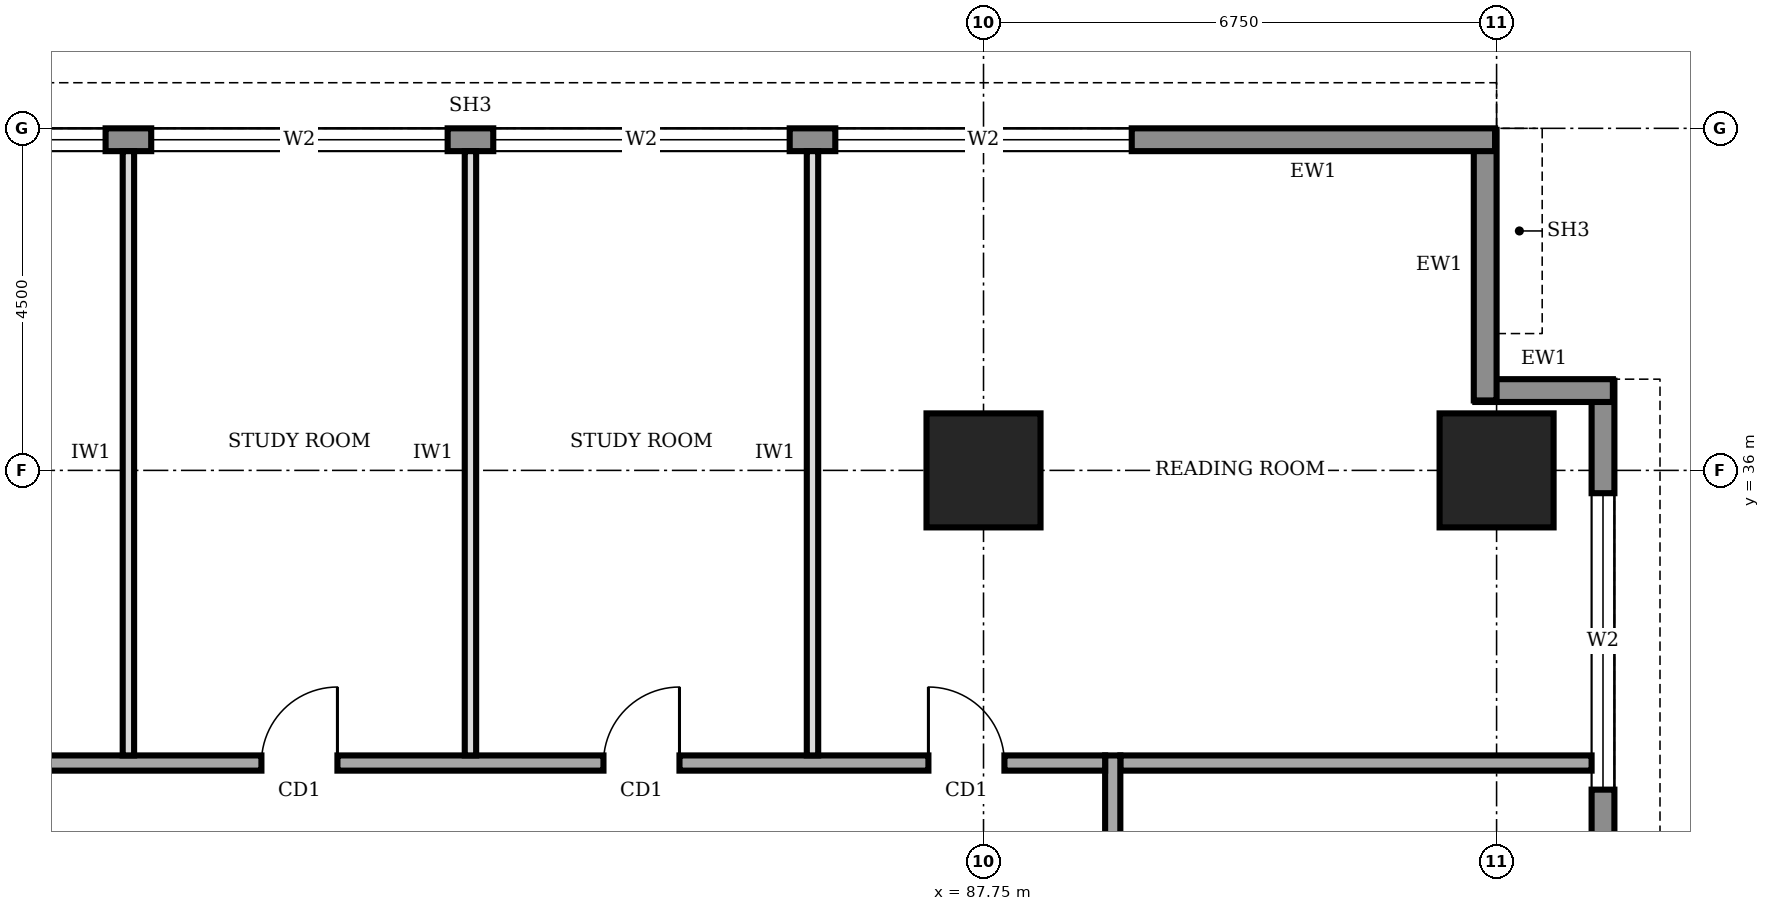
"""IFC4 building model, lengths in metres.
Left out: names, types, materials, properties, quantities, classifications, styles, units other than length and angle.
Written with IfcOpenShell. Run it as: python <this file> out.ifc"""

import sys

from ifc_helpers import new_model, si_unit, direction, frame, frame_2d, origin, origin_2d, place, context, subcontext, project, spatial, rectangle, extrude, element, fill, save


model = new_model("IFC4")
c1 = context("Model", 3, precision=1e-05, world=origin(), true_north=direction((0.0, 1.0)))
c2 = subcontext(c1, "Body", "Model", "MODEL_VIEW")
j1 = project(units=[si_unit("LENGTHUNIT", "METRE"), si_unit("PLANEANGLEUNIT", "RADIAN")], contexts=[c1])
p1 = place(None, origin())
s1 = spatial("IfcSite", under=j1, at=p1, CompositionType="ELEMENT")
p2 = place(p1, origin())
s2 = spatial("IfcBuilding", under=s1, at=p2, CompositionType="ELEMENT")
p3 = place(p2, frame((0.0, 0.0, 161.0)))
s3 = spatial("IfcBuildingStorey", under=s2, at=p3, CompositionType="ELEMENT", Elevation=161.0)
for number, where, z_axis, x_axis in (
    (1, (87.75, 36.0, 0.0), (0.0, 0.0, 1.0), (1.0, 0.0, 0.0)),
    (2, (94.5, 36.0, 0.0), (0.0, 0.0, 1.0), (1.0, 0.0, 0.0)),
):
    element("IfcColumn", number, at=place(p3, frame(where, z_axis=z_axis, x_axis=x_axis)), inside=s3, PredefinedType="COLUMN", context=c2, shape_type="SweptSolid", body=[
        extrude(rectangle(XDim=1.5, YDim=1.5, at=origin_2d()), origin(), (0.0, 0.0, 1.0), 4.0),
    ])
p4 = place(p3, frame((95.9, 3.32, 0.0), z_axis=(0.0, 0.0, 1.0), x_axis=(0.0, 1.0, 0.0)))
e3 = element("IfcWall", 3, at=p4, inside=s3, PredefinedType="STANDARD", context=c2, shape_type="SweptSolid", body=[
    extrude(rectangle(XDim=33.86, YDim=0.3, at=frame_2d((16.93, 0.0))), origin(), (0.0, 0.0, 1.0), 3.75),
])
p5 = place(p4, frame((1.48, 0.0, 0.6)))
e4 = element("IfcOpeningElement", 4, at=p5, cuts=e3, PredefinedType="OPENING", context=c2, shape_type="SweptSolid", body=[
    extrude(rectangle(XDim=3.9, YDim=2.6, at=frame_2d((1.95, 1.3))), frame((0.0, 0.16, 0.0), z_axis=(0.0, -1.0, 0.0), x_axis=(1.0, 0.0, 0.0)), (0.0, 0.0, 1.0), 0.32),
])
p6 = place(p4, frame((5.98, 0.0, 0.6)))
e5 = element("IfcOpeningElement", 5, at=p6, cuts=e3, PredefinedType="OPENING", context=c2, shape_type="SweptSolid", body=[
    extrude(rectangle(XDim=3.9, YDim=2.6, at=frame_2d((1.95, 1.3))), frame((0.0, 0.16, 0.0), z_axis=(0.0, -1.0, 0.0), x_axis=(1.0, 0.0, 0.0)), (0.0, 0.0, 1.0), 0.32),
])
p7 = place(p4, frame((10.48, 0.0, 0.6)))
e6 = element("IfcOpeningElement", 6, at=p7, cuts=e3, PredefinedType="OPENING", context=c2, shape_type="SweptSolid", body=[
    extrude(rectangle(XDim=3.9, YDim=2.6, at=frame_2d((1.95, 1.3))), frame((0.0, 0.16, 0.0), z_axis=(0.0, -1.0, 0.0), x_axis=(1.0, 0.0, 0.0)), (0.0, 0.0, 1.0), 0.32),
])
p8 = place(p4, frame((14.98, 0.0, 0.6)))
e7 = element("IfcOpeningElement", 7, at=p8, cuts=e3, PredefinedType="OPENING", context=c2, shape_type="SweptSolid", body=[
    extrude(rectangle(XDim=3.9, YDim=2.6, at=frame_2d((1.95, 1.3))), frame((0.0, 0.16, 0.0), z_axis=(0.0, -1.0, 0.0), x_axis=(1.0, 0.0, 0.0)), (0.0, 0.0, 1.0), 0.32),
])
p9 = place(p4, frame((19.48, 0.0, 0.6)))
e8 = element("IfcOpeningElement", 8, at=p9, cuts=e3, PredefinedType="OPENING", context=c2, shape_type="SweptSolid", body=[
    extrude(rectangle(XDim=3.9, YDim=2.6, at=frame_2d((1.95, 1.3))), frame((0.0, 0.16, 0.0), z_axis=(0.0, -1.0, 0.0), x_axis=(1.0, 0.0, 0.0)), (0.0, 0.0, 1.0), 0.32),
])
p10 = place(p4, frame((23.98, 0.0, 0.6)))
e9 = element("IfcOpeningElement", 9, at=p10, cuts=e3, PredefinedType="OPENING", context=c2, shape_type="SweptSolid", body=[
    extrude(rectangle(XDim=3.9, YDim=2.6, at=frame_2d((1.95, 1.3))), frame((0.0, 0.16, 0.0), z_axis=(0.0, -1.0, 0.0), x_axis=(1.0, 0.0, 0.0)), (0.0, 0.0, 1.0), 0.32),
])
p11 = place(p4, frame((28.48, 0.0, 0.6)))
e10 = element("IfcOpeningElement", 10, at=p11, cuts=e3, PredefinedType="OPENING", context=c2, shape_type="SweptSolid", body=[
    extrude(rectangle(XDim=3.9, YDim=2.6, at=frame_2d((1.95, 1.3))), frame((0.0, 0.16, 0.0), z_axis=(0.0, -1.0, 0.0), x_axis=(1.0, 0.0, 0.0)), (0.0, 0.0, 1.0), 0.32),
])
p12 = place(p3, frame((96.03, 37.05, 0.0), z_axis=(0.0, 0.0, 1.0), x_axis=(-1.0, 0.0, 0.0)))
e11 = element("IfcWall", 11, at=p12, inside=s3, PredefinedType="STANDARD", context=c2, shape_type="SweptSolid", body=[
    extrude(rectangle(XDim=1.81, YDim=0.3, at=frame_2d((0.905, 0.0))), origin(), (0.0, 0.0, 1.0), 3.75),
])
p13 = place(p3, frame((94.35, 36.92, 0.0), z_axis=(0.0, 0.0, 1.0), x_axis=(0.0, 1.0, 0.0)))
e12 = element("IfcWall", 12, at=p13, inside=s3, PredefinedType="STANDARD", context=c2, shape_type="SweptSolid", body=[
    extrude(rectangle(XDim=3.56, YDim=0.3, at=frame_2d((1.78, 0.0))), origin(), (0.0, 0.0, 1.0), 2.85),
])
p14 = place(p3, frame((94.48, 40.35, 0.0), z_axis=(0.0, 0.0, 1.0), x_axis=(-1.0, 0.0, 0.0)))
e13 = element("IfcWall", 13, at=p14, inside=s3, PredefinedType="STANDARD", context=c2, shape_type="SweptSolid", body=[
    extrude(rectangle(XDim=26.96, YDim=0.3, at=frame_2d((13.48, 0.0))), origin(), (0.0, 0.0, 1.0), 3.75),
])
p15 = place(p14, frame((22.78, 0.0, 0.6)))
e14 = element("IfcOpeningElement", 14, at=p15, cuts=e13, PredefinedType="OPENING", context=c2, shape_type="SweptSolid", body=[
    extrude(rectangle(XDim=3.9, YDim=2.6, at=frame_2d((1.95, 1.3))), frame((0.0, 0.16, 0.0), z_axis=(0.0, -1.0, 0.0), x_axis=(1.0, 0.0, 0.0)), (0.0, 0.0, 1.0), 0.32),
])
p16 = place(p14, frame((18.28, 0.0, 0.6)))
e15 = element("IfcOpeningElement", 15, at=p16, cuts=e13, PredefinedType="OPENING", context=c2, shape_type="SweptSolid", body=[
    extrude(rectangle(XDim=3.9, YDim=2.6, at=frame_2d((1.95, 1.3))), frame((0.0, 0.16, 0.0), z_axis=(0.0, -1.0, 0.0), x_axis=(1.0, 0.0, 0.0)), (0.0, 0.0, 1.0), 0.32),
])
p17 = place(p14, frame((13.78, 0.0, 0.6)))
e16 = element("IfcOpeningElement", 16, at=p17, cuts=e13, PredefinedType="OPENING", context=c2, shape_type="SweptSolid", body=[
    extrude(rectangle(XDim=3.9, YDim=2.6, at=frame_2d((1.95, 1.3))), frame((0.0, 0.16, 0.0), z_axis=(0.0, -1.0, 0.0), x_axis=(1.0, 0.0, 0.0)), (0.0, 0.0, 1.0), 0.32),
])
p18 = place(p14, frame((9.28, 0.0, 0.6)))
e17 = element("IfcOpeningElement", 17, at=p18, cuts=e13, PredefinedType="OPENING", context=c2, shape_type="SweptSolid", body=[
    extrude(rectangle(XDim=3.9, YDim=2.6, at=frame_2d((1.95, 1.3))), frame((0.0, 0.16, 0.0), z_axis=(0.0, -1.0, 0.0), x_axis=(1.0, 0.0, 0.0)), (0.0, 0.0, 1.0), 0.32),
])
p19 = place(p14, frame((4.78, 0.0, 0.6)))
e18 = element("IfcOpeningElement", 18, at=p19, cuts=e13, PredefinedType="OPENING", context=c2, shape_type="SweptSolid", body=[
    extrude(rectangle(XDim=3.9, YDim=2.6, at=frame_2d((1.95, 1.3))), frame((0.0, 0.16, 0.0), z_axis=(0.0, -1.0, 0.0), x_axis=(1.0, 0.0, 0.0)), (0.0, 0.0, 1.0), 0.32),
])
p20 = place(p3, frame((89.45, 9.2, 0.0), z_axis=(0.0, 0.0, 1.0), x_axis=(0.0, 1.0, 0.0)))
e19 = element("IfcWall", 19, at=p20, inside=s3, PredefinedType="SOLIDWALL", context=c2, shape_type="SweptSolid", body=[
    extrude(rectangle(XDim=23.05, YDim=0.2, at=frame_2d((11.525, 0.0))), origin(), (0.0, 0.0, 1.0), 3.75),
])
p21 = place(p20, frame((1.55, 0.0, 0.0)))
e20 = element("IfcOpeningElement", 20, at=p21, cuts=e19, PredefinedType="OPENING", context=c2, shape_type="SweptSolid", body=[
    extrude(rectangle(XDim=1.0, YDim=2.1, at=frame_2d((0.5, 1.05))), frame((0.0, 0.11, 0.0), z_axis=(0.0, -1.0, 0.0), x_axis=(1.0, 0.0, 0.0)), (0.0, 0.0, 1.0), 0.22),
])
p22 = place(p20, frame((5.75, 0.0, 0.0)))
e21 = element("IfcOpeningElement", 21, at=p22, cuts=e19, PredefinedType="OPENING", context=c2, shape_type="SweptSolid", body=[
    extrude(rectangle(XDim=0.9, YDim=2.1, at=frame_2d((0.45, 1.05))), frame((0.0, 0.11, 0.0), z_axis=(0.0, -1.0, 0.0), x_axis=(1.0, 0.0, 0.0)), (0.0, 0.0, 1.0), 0.22),
])
p23 = place(p20, frame((8.75, 0.0, 0.0)))
e22 = element("IfcOpeningElement", 22, at=p23, cuts=e19, PredefinedType="OPENING", context=c2, shape_type="SweptSolid", body=[
    extrude(rectangle(XDim=0.9, YDim=2.1, at=frame_2d((0.45, 1.05))), frame((0.0, 0.11, 0.0), z_axis=(0.0, -1.0, 0.0), x_axis=(1.0, 0.0, 0.0)), (0.0, 0.0, 1.0), 0.22),
])
p24 = place(p20, frame((13.6, 0.0, 0.0)))
e23 = element("IfcOpeningElement", 23, at=p24, cuts=e19, PredefinedType="OPENING", context=c2, shape_type="SweptSolid", body=[
    extrude(rectangle(XDim=0.9, YDim=2.1, at=frame_2d((0.45, 1.05))), frame((0.0, 0.11, 0.0), z_axis=(0.0, -1.0, 0.0), x_axis=(1.0, 0.0, 0.0)), (0.0, 0.0, 1.0), 0.22),
])
p25 = place(p20, frame((16.3, 0.0, 0.0)))
e24 = element("IfcOpeningElement", 24, at=p25, cuts=e19, PredefinedType="OPENING", context=c2, shape_type="SweptSolid", body=[
    extrude(rectangle(XDim=1.0, YDim=2.1, at=frame_2d((0.5, 1.05))), frame((0.0, 0.11, 0.0), z_axis=(0.0, -1.0, 0.0), x_axis=(1.0, 0.0, 0.0)), (0.0, 0.0, 1.0), 0.22),
])
p26 = place(p20, frame((10.8, 0.0, 0.0)))
e25 = element("IfcOpeningElement", 25, at=p26, cuts=e19, PredefinedType="OPENING", context=c2, shape_type="SweptSolid", body=[
    extrude(rectangle(XDim=1.0, YDim=2.1, at=frame_2d((0.5, 1.05))), frame((0.0, 0.11, 0.0), z_axis=(0.0, -1.0, 0.0), x_axis=(1.0, 0.0, 0.0)), (0.0, 0.0, 1.0), 0.22),
])
p27 = place(p20, frame((19.925, 0.0, 0.0)))
e26 = element("IfcOpeningElement", 26, at=p27, cuts=e19, PredefinedType="OPENING", context=c2, shape_type="SweptSolid", body=[
    extrude(rectangle(XDim=1.0, YDim=2.1, at=frame_2d((0.5, 1.05))), frame((0.0, 0.11, 0.0), z_axis=(0.0, -1.0, 0.0), x_axis=(1.0, 0.0, 0.0)), (0.0, 0.0, 1.0), 0.22),
])
p28 = place(p3, frame((89.35, 32.15, 0.0), z_axis=(0.0, 0.0, 1.0), x_axis=(-1.0, 0.0, 0.0)))
e27 = element("IfcWall", 27, at=p28, inside=s3, PredefinedType="SOLIDWALL", context=c2, shape_type="SweptSolid", body=[
    extrude(rectangle(XDim=26.05, YDim=0.2, at=frame_2d((13.025, 0.0))), origin(), (0.0, 0.0, 1.0), 3.75),
])
p29 = place(p28, frame((19.05, 0.0, 0.0)))
e28 = element("IfcOpeningElement", 28, at=p29, cuts=e27, PredefinedType="OPENING", context=c2, shape_type="SweptSolid", body=[
    extrude(rectangle(XDim=1.0, YDim=2.1, at=frame_2d((0.5, 1.05))), frame((0.0, 0.11, 0.0), z_axis=(0.0, -1.0, 0.0), x_axis=(1.0, 0.0, 0.0)), (0.0, 0.0, 1.0), 0.22),
])
p30 = place(p28, frame((10.1, 0.0, 0.0)))
e29 = element("IfcOpeningElement", 29, at=p30, cuts=e27, PredefinedType="OPENING", context=c2, shape_type="SweptSolid", body=[
    extrude(rectangle(XDim=1.0, YDim=2.1, at=frame_2d((0.5, 1.05))), frame((0.0, 0.11, 0.0), z_axis=(0.0, -1.0, 0.0), x_axis=(1.0, 0.0, 0.0)), (0.0, 0.0, 1.0), 0.22),
])
p31 = place(p28, frame((5.6, 0.0, 0.0)))
e30 = element("IfcOpeningElement", 30, at=p31, cuts=e27, PredefinedType="OPENING", context=c2, shape_type="SweptSolid", body=[
    extrude(rectangle(XDim=1.0, YDim=2.1, at=frame_2d((0.5, 1.05))), frame((0.0, 0.11, 0.0), z_axis=(0.0, -1.0, 0.0), x_axis=(1.0, 0.0, 0.0)), (0.0, 0.0, 1.0), 0.22),
])
p32 = place(p28, frame((1.325, 0.0, 0.0)))
e31 = element("IfcOpeningElement", 31, at=p32, cuts=e27, PredefinedType="OPENING", context=c2, shape_type="SweptSolid", body=[
    extrude(rectangle(XDim=1.0, YDim=2.1, at=frame_2d((0.5, 1.05))), frame((0.0, 0.11, 0.0), z_axis=(0.0, -1.0, 0.0), x_axis=(1.0, 0.0, 0.0)), (0.0, 0.0, 1.0), 0.22),
])
p33 = place(p3, frame((89.55, 32.15, 0.0), z_axis=(0.0, 0.0, 1.0), x_axis=(1.0, 0.0, 0.0)))
e32 = element("IfcWall", 32, at=p33, inside=s3, PredefinedType="SOLIDWALL", context=c2, shape_type="SweptSolid", body=[
    extrude(rectangle(XDim=6.2, YDim=0.2, at=frame_2d((3.1, 0.0))), origin(), (0.0, 0.0, 1.0), 3.75),
])
for number, where, z_axis, x_axis in (
    (33, (76.5, 32.25, 0.0), (0.0, 0.0, 1.0), (0.0, 1.0, 0.0)),
    (34, (81.0, 32.25, 0.0), (0.0, 0.0, 1.0), (0.0, 1.0, 0.0)),
    (35, (85.5, 32.25, 0.0), (0.0, 0.0, 1.0), (0.0, 1.0, 0.0)),
):
    element("IfcWall", number, at=place(p3, frame(where, z_axis=z_axis, x_axis=x_axis)), inside=s3, PredefinedType="PARTITIONING", context=c2, shape_type="SweptSolid", body=[
        extrude(rectangle(XDim=7.95, YDim=0.15, at=frame_2d((3.975, 0.0))), origin(), (0.0, 0.0, 1.0), 3.75),
    ])
p34 = place(p11, origin())
e36 = element("IfcWindow", 36, at=p34, inside=s3, PartitioningType="SINGLE_PANEL", PredefinedType="WINDOW", context=c2, shape_type="SweptSolid", body=[
    extrude(rectangle(XDim=3.9, YDim=2.6, at=frame_2d((1.95, 1.3))), frame((0.0, 0.03, 0.0), z_axis=(0.0, -1.0, 0.0), x_axis=(1.0, 0.0, 0.0)), (0.0, 0.0, 1.0), 0.06),
])
fill(e10, e36)
p35 = place(p16, origin())
e37 = element("IfcWindow", 37, at=p35, inside=s3, PartitioningType="SINGLE_PANEL", PredefinedType="WINDOW", context=c2, shape_type="SweptSolid", body=[
    extrude(rectangle(XDim=3.9, YDim=2.6, at=frame_2d((1.95, 1.3))), frame((0.0, 0.03, 0.0), z_axis=(0.0, -1.0, 0.0), x_axis=(1.0, 0.0, 0.0)), (0.0, 0.0, 1.0), 0.06),
])
fill(e15, e37)
p36 = place(p17, origin())
e38 = element("IfcWindow", 38, at=p36, inside=s3, PartitioningType="SINGLE_PANEL", PredefinedType="WINDOW", context=c2, shape_type="SweptSolid", body=[
    extrude(rectangle(XDim=3.9, YDim=2.6, at=frame_2d((1.95, 1.3))), frame((0.0, 0.03, 0.0), z_axis=(0.0, -1.0, 0.0), x_axis=(1.0, 0.0, 0.0)), (0.0, 0.0, 1.0), 0.06),
])
fill(e16, e38)
p37 = place(p18, origin())
e39 = element("IfcWindow", 39, at=p37, inside=s3, PartitioningType="SINGLE_PANEL", PredefinedType="WINDOW", context=c2, shape_type="SweptSolid", body=[
    extrude(rectangle(XDim=3.9, YDim=2.6, at=frame_2d((1.95, 1.3))), frame((0.0, 0.03, 0.0), z_axis=(0.0, -1.0, 0.0), x_axis=(1.0, 0.0, 0.0)), (0.0, 0.0, 1.0), 0.06),
])
fill(e17, e39)
p38 = place(p19, origin())
e40 = element("IfcWindow", 40, at=p38, inside=s3, PartitioningType="SINGLE_PANEL", PredefinedType="WINDOW", context=c2, shape_type="SweptSolid", body=[
    extrude(rectangle(XDim=3.9, YDim=2.6, at=frame_2d((1.95, 1.3))), frame((0.0, 0.03, 0.0), z_axis=(0.0, -1.0, 0.0), x_axis=(1.0, 0.0, 0.0)), (0.0, 0.0, 1.0), 0.06),
])
fill(e18, e40)
p39 = place(p30, frame((1.0, 0.0, 0.0), z_axis=(0.0, 0.0, 1.0), x_axis=(-1.0, 0.0, 0.0)))
e41 = element("IfcDoor", 41, at=p39, inside=s3, OperationType="SINGLE_SWING_RIGHT", PredefinedType="DOOR", context=c2, shape_type="SweptSolid", body=[
    extrude(rectangle(XDim=1.0, YDim=2.1, at=frame_2d((0.5, 1.05))), frame((0.0, 0.025, 0.0), z_axis=(0.0, -1.0, 0.0), x_axis=(1.0, 0.0, 0.0)), (0.0, 0.0, 1.0), 0.05),
])
fill(e29, e41)
p40 = place(p31, frame((1.0, 0.0, 0.0), z_axis=(0.0, 0.0, 1.0), x_axis=(-1.0, 0.0, 0.0)))
e42 = element("IfcDoor", 42, at=p40, inside=s3, OperationType="SINGLE_SWING_RIGHT", PredefinedType="DOOR", context=c2, shape_type="SweptSolid", body=[
    extrude(rectangle(XDim=1.0, YDim=2.1, at=frame_2d((0.5, 1.05))), frame((0.0, 0.025, 0.0), z_axis=(0.0, -1.0, 0.0), x_axis=(1.0, 0.0, 0.0)), (0.0, 0.0, 1.0), 0.05),
])
fill(e30, e42)
p41 = place(p32, frame((1.0, 0.0, 0.0), z_axis=(0.0, 0.0, 1.0), x_axis=(-1.0, 0.0, 0.0)))
e43 = element("IfcDoor", 43, at=p41, inside=s3, OperationType="SINGLE_SWING_LEFT", PredefinedType="DOOR", context=c2, shape_type="SweptSolid", body=[
    extrude(rectangle(XDim=1.0, YDim=2.1, at=frame_2d((0.5, 1.05))), frame((0.0, 0.025, 0.0), z_axis=(0.0, -1.0, 0.0), x_axis=(1.0, 0.0, 0.0)), (0.0, 0.0, 1.0), 0.05),
])
fill(e31, e43)
save(model, sys.argv[1])
